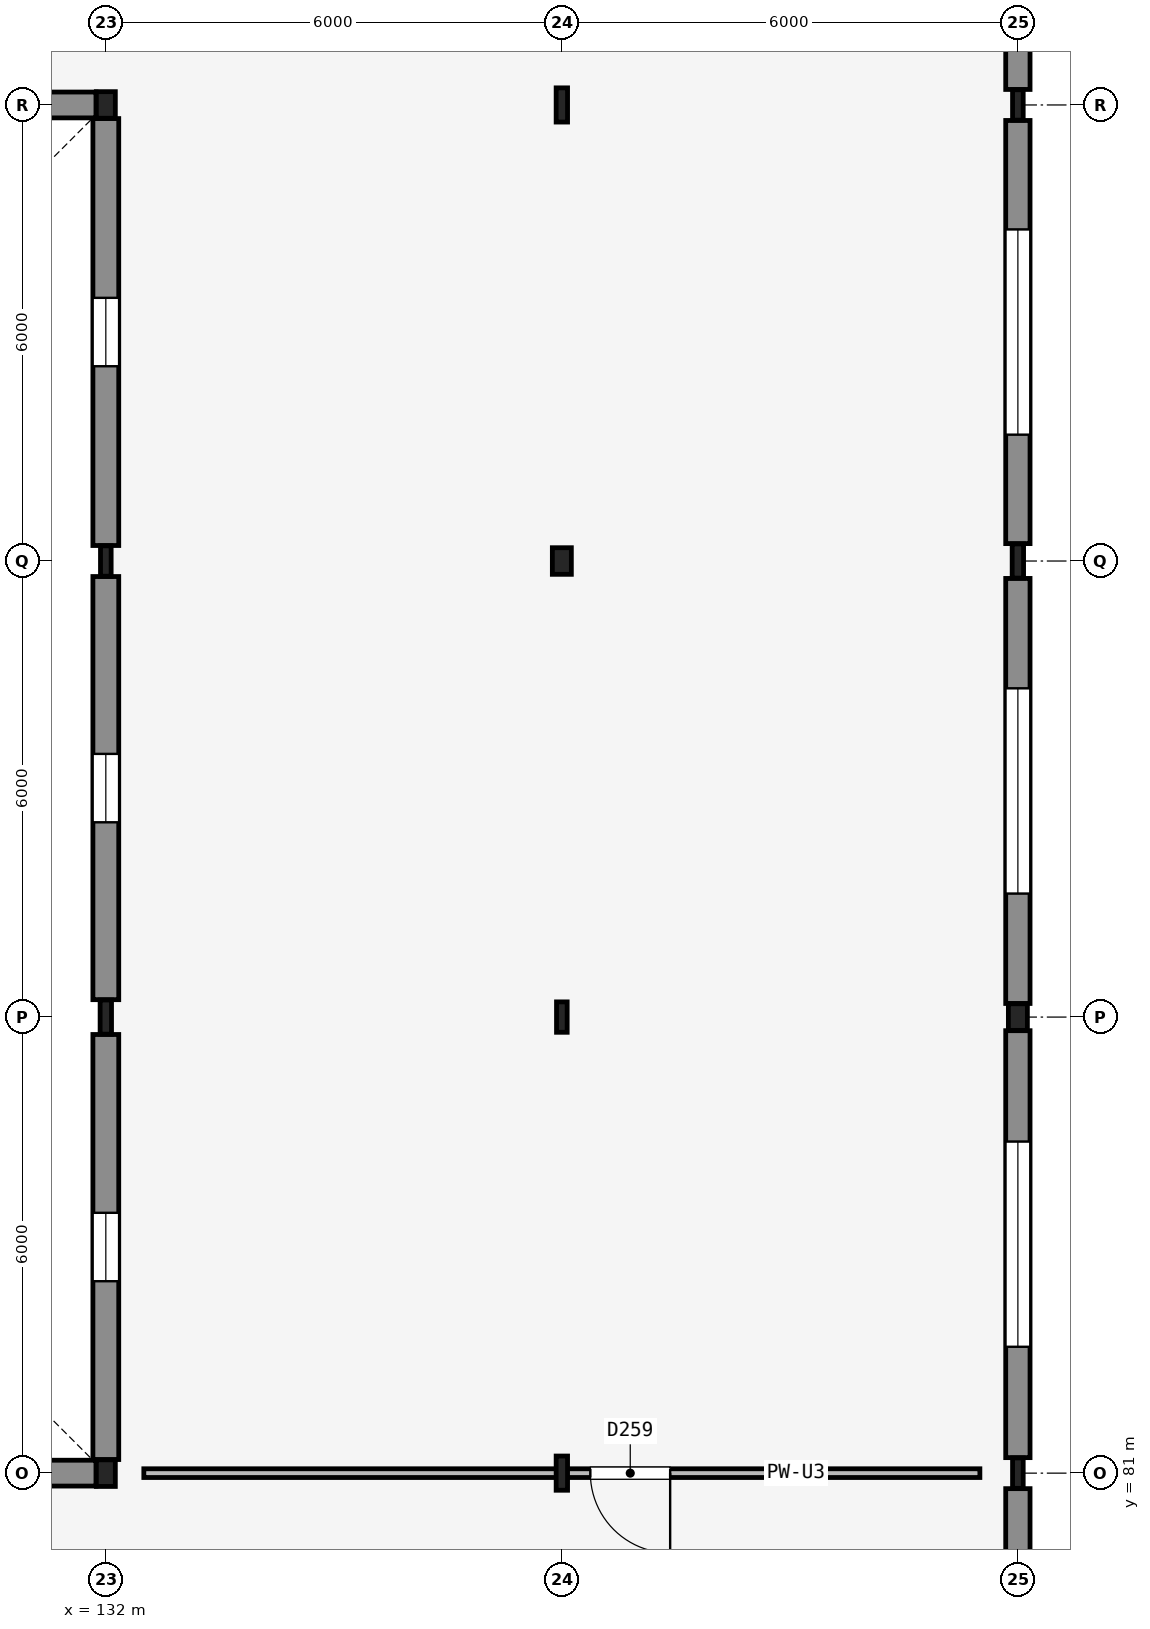
"""IFC4 building model, lengths in metres.
Left out: names, types, materials, properties, quantities, classifications, styles, units other than length and angle.
Written with IfcOpenShell. Run it as: python <this file> out.ifc"""

import sys

from ifc_helpers import new_model, si_unit, direction, frame, frame_2d, origin, origin_2d, place, context, subcontext, project, spatial, rectangle, i_section, extrude, element, fill, save


model = new_model("IFC4")
c1 = context("Model", 3, precision=1e-05, world=origin(), true_north=direction((0.0, 1.0)))
c2 = subcontext(c1, "Body", "Model", "MODEL_VIEW")
j1 = project(units=[si_unit("LENGTHUNIT", "METRE"), si_unit("PLANEANGLEUNIT", "RADIAN")], contexts=[c1])
p1 = place(None, origin())
s1 = spatial("IfcSite", under=j1, at=p1, CompositionType="ELEMENT")
p2 = place(p1, origin())
s2 = spatial("IfcBuilding", under=s1, at=p2, CompositionType="ELEMENT")
p3 = place(p2, frame((0.0, 0.0, 13.5)))
s3 = spatial("IfcBuildingStorey", under=s2, at=p3, CompositionType="ELEMENT", Elevation=13.5)
p4 = place(p3, frame((132.0, 81.0, 0.0), z_axis=(0.0, 0.0, 1.0), x_axis=(1.0, 0.0, 0.0)))
e1 = element("IfcColumn", 1, at=p4, inside=s3, PredefinedType="COLUMN", context=c2, shape_type="SweptSolid", body=[
    extrude(i_section(OverallWidth=0.25, OverallDepth=0.35, WebThickness=0.01, FlangeThickness=0.012, FilletRadius=0.012, at=origin_2d()), origin(), (0.0, 0.0, 1.0), 4.5),
])
p5 = place(p3, frame((132.0, 87.0, 0.0), z_axis=(0.0, 0.0, 1.0), x_axis=(1.0, 0.0, 0.0)))
e2 = element("IfcColumn", 2, at=p5, inside=s3, PredefinedType="COLUMN", context=c2, shape_type="SweptSolid", body=[
    extrude(i_section(OverallWidth=0.15, OverallDepth=0.45, WebThickness=0.01, FlangeThickness=0.017, FilletRadius=0.015, at=origin_2d()), origin(), (0.0, 0.0, 1.0), 4.5),
])
p6 = place(p3, frame((132.0, 93.0, 0.0), z_axis=(0.0, 0.0, 1.0), x_axis=(1.0, 0.0, 0.0)))
e3 = element("IfcColumn", 3, at=p6, inside=s3, PredefinedType="COLUMN", context=c2, shape_type="SweptSolid", body=[
    extrude(i_section(OverallWidth=0.14, OverallDepth=0.4, WebThickness=0.009, FlangeThickness=0.016, FilletRadius=0.014, at=origin_2d()), origin(), (0.0, 0.0, 1.0), 4.5),
])
p7 = place(p3, frame((132.0, 99.0, 0.0), z_axis=(0.0, 0.0, 1.0), x_axis=(1.0, 0.0, 0.0)))
e4 = element("IfcColumn", 4, at=p7, inside=s3, PredefinedType="COLUMN", context=c2, shape_type="SweptSolid", body=[
    extrude(i_section(OverallWidth=0.25, OverallDepth=0.35, WebThickness=0.01, FlangeThickness=0.012, FilletRadius=0.012, at=origin_2d()), origin(), (0.0, 0.0, 1.0), 4.5),
])
p8 = place(p3, frame((138.0, 81.0, 0.0), z_axis=(0.0, 0.0, 1.0), x_axis=(1.0, 0.0, 0.0)))
e5 = element("IfcColumn", 5, at=p8, inside=s3, PredefinedType="COLUMN", context=c2, shape_type="SweptSolid", body=[
    extrude(i_section(OverallWidth=0.15, OverallDepth=0.45, WebThickness=0.01, FlangeThickness=0.017, FilletRadius=0.015, at=origin_2d()), origin(), (0.0, 0.0, 1.0), 4.5),
])
p9 = place(p3, frame((138.0, 87.0, 0.0), z_axis=(0.0, 0.0, 1.0), x_axis=(1.0, 0.0, 0.0)))
e6 = element("IfcColumn", 6, at=p9, inside=s3, PredefinedType="COLUMN", context=c2, shape_type="SweptSolid", body=[
    extrude(i_section(OverallWidth=0.14, OverallDepth=0.4, WebThickness=0.009, FlangeThickness=0.016, FilletRadius=0.014, at=origin_2d()), origin(), (0.0, 0.0, 1.0), 4.5),
])
p10 = place(p3, frame((138.0, 93.0, 0.0), z_axis=(0.0, 0.0, 1.0), x_axis=(1.0, 0.0, 0.0)))
e7 = element("IfcColumn", 7, at=p10, inside=s3, PredefinedType="COLUMN", context=c2, shape_type="SweptSolid", body=[
    extrude(i_section(OverallWidth=0.25, OverallDepth=0.35, WebThickness=0.01, FlangeThickness=0.012, FilletRadius=0.012, at=origin_2d()), origin(), (0.0, 0.0, 1.0), 4.5),
])
p11 = place(p3, frame((138.0, 99.0, 0.0), z_axis=(0.0, 0.0, 1.0), x_axis=(1.0, 0.0, 0.0)))
e8 = element("IfcColumn", 8, at=p11, inside=s3, PredefinedType="COLUMN", context=c2, shape_type="SweptSolid", body=[
    extrude(i_section(OverallWidth=0.15, OverallDepth=0.45, WebThickness=0.01, FlangeThickness=0.017, FilletRadius=0.015, at=origin_2d()), origin(), (0.0, 0.0, 1.0), 4.5),
])
p12 = place(p3, frame((144.0, 81.0, 0.0), z_axis=(0.0, 0.0, 1.0), x_axis=(1.0, 0.0, 0.0)))
e9 = element("IfcColumn", 9, at=p12, inside=s3, PredefinedType="COLUMN", context=c2, shape_type="SweptSolid", body=[
    extrude(i_section(OverallWidth=0.14, OverallDepth=0.4, WebThickness=0.009, FlangeThickness=0.016, FilletRadius=0.014, at=origin_2d()), origin(), (0.0, 0.0, 1.0), 4.5),
])
p13 = place(p3, frame((144.0, 87.0, 0.0), z_axis=(0.0, 0.0, 1.0), x_axis=(1.0, 0.0, 0.0)))
e10 = element("IfcColumn", 10, at=p13, inside=s3, PredefinedType="COLUMN", context=c2, shape_type="SweptSolid", body=[
    extrude(i_section(OverallWidth=0.25, OverallDepth=0.35, WebThickness=0.01, FlangeThickness=0.012, FilletRadius=0.012, at=origin_2d()), origin(), (0.0, 0.0, 1.0), 4.5),
])
p14 = place(p3, frame((144.0, 93.0, 0.0), z_axis=(0.0, 0.0, 1.0), x_axis=(1.0, 0.0, 0.0)))
e11 = element("IfcColumn", 11, at=p14, inside=s3, PredefinedType="COLUMN", context=c2, shape_type="SweptSolid", body=[
    extrude(i_section(OverallWidth=0.15, OverallDepth=0.45, WebThickness=0.01, FlangeThickness=0.017, FilletRadius=0.015, at=origin_2d()), origin(), (0.0, 0.0, 1.0), 4.5),
])
p15 = place(p3, frame((144.0, 99.0, 0.0), z_axis=(0.0, 0.0, 1.0), x_axis=(1.0, 0.0, 0.0)))
e12 = element("IfcColumn", 12, at=p15, inside=s3, PredefinedType="COLUMN", context=c2, shape_type="SweptSolid", body=[
    extrude(i_section(OverallWidth=0.14, OverallDepth=0.4, WebThickness=0.009, FlangeThickness=0.016, FilletRadius=0.014, at=origin_2d()), origin(), (0.0, 0.0, 1.0), 4.5),
])
p16 = place(p3, frame((144.0, 75.229, 0.0), z_axis=(0.0, 0.0, 1.0), x_axis=(0.0, 1.0, 0.0)))
e13 = element("IfcWall", 13, at=p16, inside=s3, PredefinedType="SOLIDWALL", context=c2, shape_type="SweptSolid", body=[
    extrude(rectangle(XDim=5.567, YDim=0.32, at=frame_2d((2.783, 0.0))), origin(), (0.0, 0.0, 1.0), 3.64),
])
p17 = place(p16, frame((1.434, 0.0, 0.9)))
e14 = element("IfcOpeningElement", 14, at=p17, cuts=e13, PredefinedType="OPENING", context=c2, shape_type="SweptSolid", body=[
    extrude(rectangle(XDim=2.7, YDim=1.5, at=frame_2d((1.35, 0.75))), frame((0.0, 0.17, 0.0), z_axis=(0.0, -1.0, 0.0), x_axis=(1.0, 0.0, 0.0)), (0.0, 0.0, 1.0), 0.34),
])
p18 = place(p3, frame((144.0, 81.204, 0.0), z_axis=(0.0, 0.0, 1.0), x_axis=(0.0, 1.0, 0.0)))
e15 = element("IfcWall", 15, at=p18, inside=s3, PredefinedType="SOLIDWALL", context=c2, shape_type="SweptSolid", body=[
    extrude(rectangle(XDim=5.617, YDim=0.32, at=frame_2d((2.809, 0.0))), origin(), (0.0, 0.0, 1.0), 3.64),
])
p19 = place(p18, frame((1.458, 0.0, 0.9)))
e16 = element("IfcOpeningElement", 16, at=p19, cuts=e15, PredefinedType="OPENING", context=c2, shape_type="SweptSolid", body=[
    extrude(rectangle(XDim=2.7, YDim=1.5, at=frame_2d((1.35, 0.75))), frame((0.0, 0.17, 0.0), z_axis=(0.0, -1.0, 0.0), x_axis=(1.0, 0.0, 0.0)), (0.0, 0.0, 1.0), 0.34),
])
p20 = place(p3, frame((144.0, 87.179, 0.0), z_axis=(0.0, 0.0, 1.0), x_axis=(0.0, 1.0, 0.0)))
e17 = element("IfcWall", 17, at=p20, inside=s3, PredefinedType="SOLIDWALL", context=c2, shape_type="SweptSolid", body=[
    extrude(rectangle(XDim=5.592, YDim=0.32, at=frame_2d((2.796, 0.0))), origin(), (0.0, 0.0, 1.0), 3.64),
])
p21 = place(p20, frame((1.446, 0.0, 0.9)))
e18 = element("IfcOpeningElement", 18, at=p21, cuts=e17, PredefinedType="OPENING", context=c2, shape_type="SweptSolid", body=[
    extrude(rectangle(XDim=2.7, YDim=1.5, at=frame_2d((1.35, 0.75))), frame((0.0, 0.17, 0.0), z_axis=(0.0, -1.0, 0.0), x_axis=(1.0, 0.0, 0.0)), (0.0, 0.0, 1.0), 0.34),
])
p22 = place(p3, frame((144.0, 93.229, 0.0), z_axis=(0.0, 0.0, 1.0), x_axis=(0.0, 1.0, 0.0)))
e19 = element("IfcWall", 19, at=p22, inside=s3, PredefinedType="SOLIDWALL", context=c2, shape_type="SweptSolid", body=[
    extrude(rectangle(XDim=5.567, YDim=0.32, at=frame_2d((2.783, 0.0))), origin(), (0.0, 0.0, 1.0), 3.64),
])
p23 = place(p22, frame((1.434, 0.0, 0.9)))
e20 = element("IfcOpeningElement", 20, at=p23, cuts=e19, PredefinedType="OPENING", context=c2, shape_type="SweptSolid", body=[
    extrude(rectangle(XDim=2.7, YDim=1.5, at=frame_2d((1.35, 0.75))), frame((0.0, 0.17, 0.0), z_axis=(0.0, -1.0, 0.0), x_axis=(1.0, 0.0, 0.0)), (0.0, 0.0, 1.0), 0.34),
])
p24 = place(p3, frame((144.0, 99.204, 0.0), z_axis=(0.0, 0.0, 1.0), x_axis=(0.0, 1.0, 0.0)))
e21 = element("IfcWall", 21, at=p24, inside=s3, PredefinedType="SOLIDWALL", context=c2, shape_type="SweptSolid", body=[
    extrude(rectangle(XDim=5.617, YDim=0.32, at=frame_2d((2.809, 0.0))), origin(), (0.0, 0.0, 1.0), 3.64),
])
p25 = place(p24, frame((1.458, 0.0, 0.9)))
e22 = element("IfcOpeningElement", 22, at=p25, cuts=e21, PredefinedType="OPENING", context=c2, shape_type="SweptSolid", body=[
    extrude(rectangle(XDim=2.7, YDim=1.5, at=frame_2d((1.35, 0.75))), frame((0.0, 0.17, 0.0), z_axis=(0.0, -1.0, 0.0), x_axis=(1.0, 0.0, 0.0)), (0.0, 0.0, 1.0), 0.34),
])
p26 = place(p3, frame((126.074, 81.0, 0.0), z_axis=(0.0, 0.0, 1.0), x_axis=(1.0, 0.0, 0.0)))
e23 = element("IfcWall", 23, at=p26, inside=s3, PredefinedType="SOLIDWALL", context=c2, shape_type="SweptSolid", body=[
    extrude(rectangle(XDim=5.797, YDim=0.34, at=frame_2d((2.898, 0.0))), origin(), (0.0, 0.0, 1.0), 3.59),
])
p27 = place(p26, frame((2.448, 0.0, 1.6)))
e24 = element("IfcOpeningElement", 24, at=p27, cuts=e23, PredefinedType="OPENING", context=c2, shape_type="SweptSolid", body=[
    extrude(rectangle(XDim=0.9, YDim=0.6, at=frame_2d((0.45, 0.3))), frame((0.0, 0.18, 0.0), z_axis=(0.0, -1.0, 0.0), x_axis=(1.0, 0.0, 0.0)), (0.0, 0.0, 1.0), 0.36),
])
p28 = place(p3, frame((126.074, 99.0, 0.0), z_axis=(0.0, 0.0, 1.0), x_axis=(1.0, 0.0, 0.0)))
e25 = element("IfcWall", 25, at=p28, inside=s3, PredefinedType="SOLIDWALL", context=c2, shape_type="SweptSolid", body=[
    extrude(rectangle(XDim=5.797, YDim=0.34, at=frame_2d((2.898, 0.0))), origin(), (0.0, 0.0, 1.0), 3.69),
])
p29 = place(p28, frame((2.448, 0.0, 1.6)))
e26 = element("IfcOpeningElement", 26, at=p29, cuts=e25, PredefinedType="OPENING", context=c2, shape_type="SweptSolid", body=[
    extrude(rectangle(XDim=0.9, YDim=0.6, at=frame_2d((0.45, 0.3))), frame((0.0, 0.18, 0.0), z_axis=(0.0, -1.0, 0.0), x_axis=(1.0, 0.0, 0.0)), (0.0, 0.0, 1.0), 0.36),
])
p30 = place(p3, frame((132.0, 81.179, 0.0), z_axis=(0.0, 0.0, 1.0), x_axis=(0.0, 1.0, 0.0)))
e27 = element("IfcWall", 27, at=p30, inside=s3, PredefinedType="SOLIDWALL", context=c2, shape_type="SweptSolid", body=[
    extrude(rectangle(XDim=5.592, YDim=0.34, at=frame_2d((2.796, 0.0))), origin(), (0.0, 0.0, 1.0), 3.59),
])
p31 = place(p30, frame((2.346, 0.0, 1.6)))
e28 = element("IfcOpeningElement", 28, at=p31, cuts=e27, PredefinedType="OPENING", context=c2, shape_type="SweptSolid", body=[
    extrude(rectangle(XDim=0.9, YDim=0.6, at=frame_2d((0.45, 0.3))), frame((0.0, 0.18, 0.0), z_axis=(0.0, -1.0, 0.0), x_axis=(1.0, 0.0, 0.0)), (0.0, 0.0, 1.0), 0.36),
])
p32 = place(p3, frame((132.0, 87.229, 0.0), z_axis=(0.0, 0.0, 1.0), x_axis=(0.0, 1.0, 0.0)))
e29 = element("IfcWall", 29, at=p32, inside=s3, PredefinedType="SOLIDWALL", context=c2, shape_type="SweptSolid", body=[
    extrude(rectangle(XDim=5.567, YDim=0.34, at=frame_2d((2.783, 0.0))), origin(), (0.0, 0.0, 1.0), 3.59),
])
p33 = place(p32, frame((2.333, 0.0, 1.6)))
e30 = element("IfcOpeningElement", 30, at=p33, cuts=e29, PredefinedType="OPENING", context=c2, shape_type="SweptSolid", body=[
    extrude(rectangle(XDim=0.9, YDim=0.6, at=frame_2d((0.45, 0.3))), frame((0.0, 0.18, 0.0), z_axis=(0.0, -1.0, 0.0), x_axis=(1.0, 0.0, 0.0)), (0.0, 0.0, 1.0), 0.36),
])
p34 = place(p3, frame((132.0, 93.204, 0.0), z_axis=(0.0, 0.0, 1.0), x_axis=(0.0, 1.0, 0.0)))
e31 = element("IfcWall", 31, at=p34, inside=s3, PredefinedType="SOLIDWALL", context=c2, shape_type="SweptSolid", body=[
    extrude(rectangle(XDim=5.617, YDim=0.34, at=frame_2d((2.809, 0.0))), origin(), (0.0, 0.0, 1.0), 3.59),
])
p35 = place(p34, frame((2.358, 0.0, 1.6)))
e32 = element("IfcOpeningElement", 32, at=p35, cuts=e31, PredefinedType="OPENING", context=c2, shape_type="SweptSolid", body=[
    extrude(rectangle(XDim=0.9, YDim=0.6, at=frame_2d((0.45, 0.3))), frame((0.0, 0.18, 0.0), z_axis=(0.0, -1.0, 0.0), x_axis=(1.0, 0.0, 0.0)), (0.0, 0.0, 1.0), 0.36),
])
p36 = place(p3, frame((143.5, 81.0, 0.0), z_axis=(0.0, 0.0, 1.0), x_axis=(-1.0, 0.0, 0.0)))
e33 = element("IfcWall", 33, at=p36, inside=s3, PredefinedType="PARTITIONING", context=c2, shape_type="SweptSolid", body=[
    extrude(rectangle(XDim=11.0, YDim=0.115, at=frame_2d((5.5, 0.0))), origin(), (0.0, 0.0, 1.0), 3.59),
])
p37 = place(p36, frame((4.075, 0.0, 0.0)))
e34 = element("IfcOpeningElement", 34, at=p37, cuts=e33, PredefinedType="OPENING", context=c2, shape_type="SweptSolid", body=[
    extrude(rectangle(XDim=1.05, YDim=2.2, at=frame_2d((0.525, 1.1))), frame((0.0, 0.067, 0.0), z_axis=(0.0, -1.0, 0.0), x_axis=(1.0, 0.0, 0.0)), (0.0, 0.0, 1.0), 0.135),
])
p38 = place(p19, origin())
e35 = element("IfcWindow", 35, at=p38, inside=s3, PartitioningType="SINGLE_PANEL", PredefinedType="WINDOW", context=c2, shape_type="SweptSolid", body=[
    extrude(rectangle(XDim=2.7, YDim=1.5, at=frame_2d((1.35, 0.75))), frame((0.0, 0.03, 0.0), z_axis=(0.0, -1.0, 0.0), x_axis=(1.0, 0.0, 0.0)), (0.0, 0.0, 1.0), 0.06),
])
fill(e16, e35)
p39 = place(p21, origin())
e36 = element("IfcWindow", 36, at=p39, inside=s3, PartitioningType="SINGLE_PANEL", PredefinedType="WINDOW", context=c2, shape_type="SweptSolid", body=[
    extrude(rectangle(XDim=2.7, YDim=1.5, at=frame_2d((1.35, 0.75))), frame((0.0, 0.03, 0.0), z_axis=(0.0, -1.0, 0.0), x_axis=(1.0, 0.0, 0.0)), (0.0, 0.0, 1.0), 0.06),
])
fill(e18, e36)
p40 = place(p23, origin())
e37 = element("IfcWindow", 37, at=p40, inside=s3, PartitioningType="SINGLE_PANEL", PredefinedType="WINDOW", context=c2, shape_type="SweptSolid", body=[
    extrude(rectangle(XDim=2.7, YDim=1.5, at=frame_2d((1.35, 0.75))), frame((0.0, 0.03, 0.0), z_axis=(0.0, -1.0, 0.0), x_axis=(1.0, 0.0, 0.0)), (0.0, 0.0, 1.0), 0.06),
])
fill(e20, e37)
p41 = place(p31, origin())
e38 = element("IfcWindow", 38, at=p41, inside=s3, PartitioningType="SINGLE_PANEL", PredefinedType="WINDOW", context=c2, shape_type="SweptSolid", body=[
    extrude(rectangle(XDim=0.9, YDim=0.6, at=frame_2d((0.45, 0.3))), frame((0.0, 0.03, 0.0), z_axis=(0.0, -1.0, 0.0), x_axis=(1.0, 0.0, 0.0)), (0.0, 0.0, 1.0), 0.06),
])
fill(e28, e38)
p42 = place(p33, origin())
e39 = element("IfcWindow", 39, at=p42, inside=s3, PartitioningType="SINGLE_PANEL", PredefinedType="WINDOW", context=c2, shape_type="SweptSolid", body=[
    extrude(rectangle(XDim=0.9, YDim=0.6, at=frame_2d((0.45, 0.3))), frame((0.0, 0.03, 0.0), z_axis=(0.0, -1.0, 0.0), x_axis=(1.0, 0.0, 0.0)), (0.0, 0.0, 1.0), 0.06),
])
fill(e30, e39)
p43 = place(p35, origin())
e40 = element("IfcWindow", 40, at=p43, inside=s3, PartitioningType="SINGLE_PANEL", PredefinedType="WINDOW", context=c2, shape_type="SweptSolid", body=[
    extrude(rectangle(XDim=0.9, YDim=0.6, at=frame_2d((0.45, 0.3))), frame((0.0, 0.03, 0.0), z_axis=(0.0, -1.0, 0.0), x_axis=(1.0, 0.0, 0.0)), (0.0, 0.0, 1.0), 0.06),
])
fill(e32, e40)
p44 = place(p37, origin())
e41 = element("IfcDoor", 41, at=p44, inside=s3, OperationType="SINGLE_SWING_LEFT", PredefinedType="DOOR", context=c2, shape_type="SweptSolid", body=[
    extrude(rectangle(XDim=1.05, YDim=2.2, at=frame_2d((0.525, 1.1))), frame((0.0, 0.025, 0.0), z_axis=(0.0, -1.0, 0.0), x_axis=(1.0, 0.0, 0.0)), (0.0, 0.0, 1.0), 0.05),
])
fill(e34, e41)
save(model, sys.argv[1])
